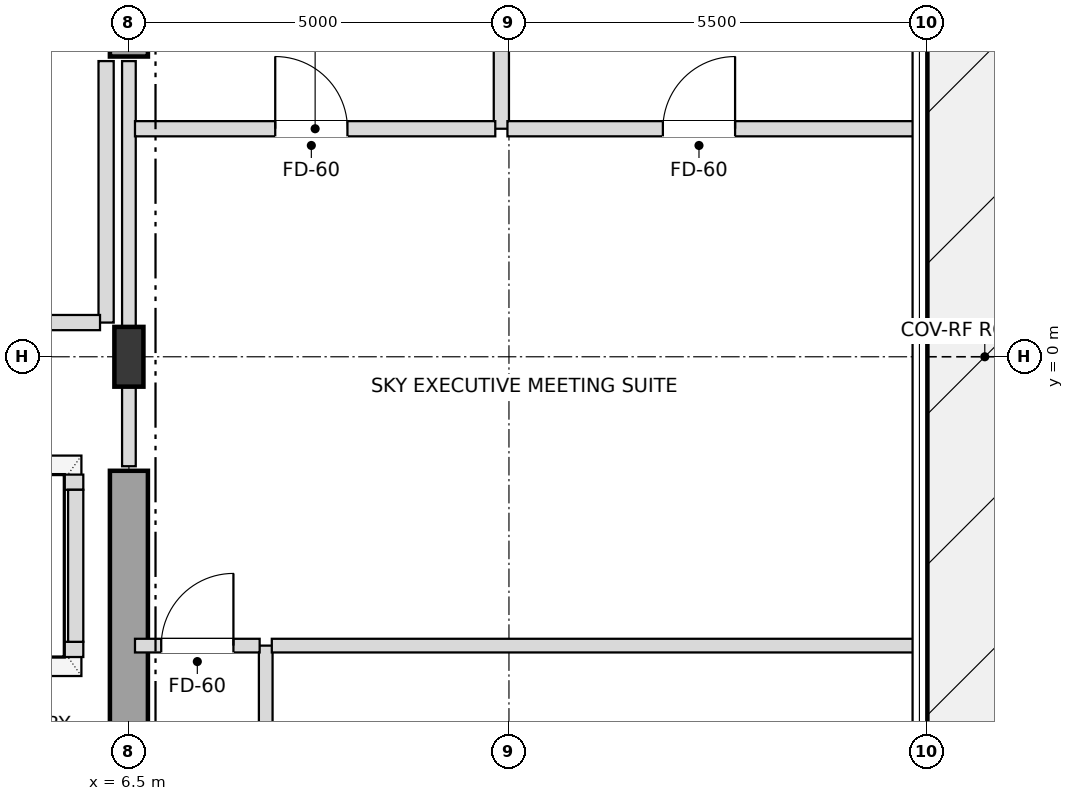
"""IFC4 building model, lengths in metres.
Left out: names, types, materials, properties, quantities, classifications, styles, units other than length and angle.
Written with IfcOpenShell. Run it as: python <this file> out.ifc"""

import sys

from ifc_helpers import new_model, si_unit, direction, frame, frame_2d, origin, origin_2d, place, context, subcontext, project, spatial, rectangle, i_section, extrude, element, fill, save


model = new_model("IFC4")
c1 = context("Model", 3, precision=1e-05, world=origin(), true_north=direction((0.0, 1.0)))
c2 = subcontext(c1, "Body", "Model", "MODEL_VIEW")
j1 = project(units=[si_unit("LENGTHUNIT", "METRE"), si_unit("PLANEANGLEUNIT", "RADIAN")], contexts=[c1])
p1 = place(None, origin())
s1 = spatial("IfcSite", under=j1, at=p1, CompositionType="ELEMENT")
p2 = place(p1, origin())
s2 = spatial("IfcBuilding", under=s1, at=p2, CompositionType="ELEMENT")
p3 = place(p2, frame((0.0, 0.0, 217.8)))
s3 = spatial("IfcBuildingStorey", under=s2, at=p3, CompositionType="ELEMENT", Elevation=217.8)
p4 = place(p3, frame((6.5, 0.0, 0.0), z_axis=(0.0, 0.0, 1.0), x_axis=(1.0, 0.0, 0.0)))
e1 = element("IfcColumn", 1, at=p4, inside=s3, PredefinedType="COLUMN", context=c2, shape_type="SweptSolid", body=[
    extrude(i_section(OverallWidth=0.382, OverallDepth=0.786, WebThickness=0.02, FlangeThickness=0.033, at=origin_2d()), origin(), (0.0, 0.0, 1.0), 4.5),
])
p5 = place(p3, frame((6.5, -7.25, 0.0), z_axis=(0.0, 0.0, 1.0), x_axis=(0.0, 1.0, 0.0)))
e2 = element("IfcWall", 2, at=p5, inside=s3, PredefinedType="SHEAR", context=c2, shape_type="SweptSolid", body=[
    extrude(rectangle(XDim=5.75, YDim=0.5, at=frame_2d((2.875, 0.0))), origin(), (0.0, 0.0, 1.0), 4.28),
])
p6 = place(p5, frame((0.85, 0.0, 0.0)))
e3 = element("IfcOpeningElement", 3, at=p6, cuts=e2, PredefinedType="OPENING", context=c2, shape_type="SweptSolid", body=[
    extrude(rectangle(XDim=1.05, YDim=2.15, at=frame_2d((0.525, 1.075))), frame((0.0, 0.26, 0.0), z_axis=(0.0, -1.0, 0.0), x_axis=(1.0, 0.0, 0.0)), (0.0, 0.0, 1.0), 0.52),
])
p7 = place(p3, frame((6.5, 3.95, 0.0), z_axis=(0.0, 0.0, 1.0), x_axis=(0.0, 1.0, 0.0)))
e4 = element("IfcWall", 4, at=p7, inside=s3, PredefinedType="SHEAR", context=c2, shape_type="SweptSolid", body=[
    extrude(rectangle(XDim=3.3, YDim=0.5, at=frame_2d((1.65, 0.0))), origin(), (0.0, 0.0, 1.0), 4.28),
])
p8 = place(p3, frame((1.8, -3.85, 0.0), z_axis=(0.0, 0.0, 1.0), x_axis=(1.0, 0.0, 0.0)))
e5 = element("IfcWall", 5, at=p8, inside=s3, PredefinedType="SOLIDWALL", context=c2, shape_type="SweptSolid", body=[
    extrude(rectangle(XDim=4.1, YDim=0.2, at=frame_2d((2.05, 0.0))), origin(), (0.0, 0.0, 1.0), 4.28),
])
p9 = place(p8, frame((0.45, 0.0, 0.0)))
e6 = element("IfcOpeningElement", 6, at=p9, cuts=e5, PredefinedType="OPENING", context=c2, shape_type="SweptSolid", body=[
    extrude(rectangle(XDim=1.2, YDim=2.2, at=frame_2d((0.6, 1.1))), frame((0.0, 0.11, 0.0), z_axis=(0.0, -1.0, 0.0), x_axis=(1.0, 0.0, 0.0)), (0.0, 0.0, 1.0), 0.22),
])
p10 = place(p8, frame((2.45, 0.0, 0.0)))
e7 = element("IfcOpeningElement", 7, at=p10, cuts=e5, PredefinedType="OPENING", context=c2, shape_type="SweptSolid", body=[
    extrude(rectangle(XDim=1.2, YDim=2.2, at=frame_2d((0.6, 1.1))), frame((0.0, 0.11, 0.0), z_axis=(0.0, -1.0, 0.0), x_axis=(1.0, 0.0, 0.0)), (0.0, 0.0, 1.0), 0.22),
])
p11 = place(p3, frame((1.8, -1.65, 0.0), z_axis=(0.0, 0.0, 1.0), x_axis=(1.0, 0.0, 0.0)))
e8 = element("IfcWall", 8, at=p11, inside=s3, PredefinedType="SOLIDWALL", context=c2, shape_type="SweptSolid", body=[
    extrude(rectangle(XDim=4.1, YDim=0.2, at=frame_2d((2.05, 0.0))), origin(), (0.0, 0.0, 1.0), 4.28),
])
p12 = place(p3, frame((5.8, -3.75, 0.0), z_axis=(0.0, 0.0, 1.0), x_axis=(0.0, 1.0, 0.0)))
e9 = element("IfcWall", 9, at=p12, inside=s3, PredefinedType="SOLIDWALL", context=c2, shape_type="SweptSolid", body=[
    extrude(rectangle(XDim=2.0, YDim=0.2, at=frame_2d((1.0, 0.0))), origin(), (0.0, 0.0, 1.0), 4.28),
])
p13 = place(p3, frame((6.2, 0.45, 0.0), z_axis=(0.0, 0.0, 1.0), x_axis=(0.0, 1.0, 0.0)))
e10 = element("IfcWall", 10, at=p13, inside=s3, PredefinedType="SOLIDWALL", context=c2, shape_type="SweptSolid", body=[
    extrude(rectangle(XDim=3.44, YDim=0.2, at=frame_2d((1.72, 0.0))), origin(), (0.0, 0.0, 1.0), 4.28),
])
p14 = place(p3, frame((6.5, -1.44, 0.0), z_axis=(0.0, 0.0, 1.0), x_axis=(0.0, 1.0, 0.0)))
e11 = element("IfcWall", 11, at=p14, inside=s3, PredefinedType="PARTITIONING", context=c2, shape_type="SweptSolid", body=[
    extrude(rectangle(XDim=5.33, YDim=0.18, at=frame_2d((2.665, 0.0))), origin(), (0.0, 0.0, 1.0), 3.726),
])
p15 = place(p3, frame((8.3, -9.2, 0.0), z_axis=(0.0, 0.0, 1.0), x_axis=(0.0, 1.0, 0.0)))
e12 = element("IfcWall", 12, at=p15, inside=s3, PredefinedType="PARTITIONING", context=c2, shape_type="SweptSolid", body=[
    extrude(rectangle(XDim=5.4, YDim=0.18, at=frame_2d((2.7, 0.0))), origin(), (0.0, 0.0, 1.0), 3.726),
])
p16 = place(p15, frame((3.125, 0.0, 0.0)))
e13 = element("IfcOpeningElement", 13, at=p16, cuts=e12, PredefinedType="OPENING", context=c2, shape_type="SweptSolid", body=[
    extrude(rectangle(XDim=0.95, YDim=2.15, at=frame_2d((0.475, 1.075))), frame((0.0, 0.1, 0.0), z_axis=(0.0, -1.0, 0.0), x_axis=(1.0, 0.0, 0.0)), (0.0, 0.0, 1.0), 0.2),
])
p17 = place(p3, frame((11.4, 3.0, 0.0), z_axis=(0.0, 0.0, 1.0), x_axis=(0.0, 1.0, 0.0)))
e14 = element("IfcWall", 14, at=p17, inside=s3, PredefinedType="SOLIDWALL", context=c2, shape_type="SweptSolid", body=[
    extrude(rectangle(XDim=4.5, YDim=0.2, at=frame_2d((2.25, 0.0))), origin(), (0.0, 0.0, 1.0), 3.918),
])
p18 = place(p3, frame((6.58, -3.8, 0.0), z_axis=(0.0, 0.0, 1.0), x_axis=(1.0, 0.0, 0.0)))
e15 = element("IfcWall", 15, at=p18, inside=s3, PredefinedType="PARTITIONING", context=c2, shape_type="SweptSolid", body=[
    extrude(rectangle(XDim=1.64, YDim=0.18, at=frame_2d((0.82, 0.0))), origin(), (0.0, 0.0, 1.0), 4.28),
])
p19 = place(p18, frame((0.345, 0.0, 0.0)))
e16 = element("IfcOpeningElement", 16, at=p19, cuts=e15, PredefinedType="OPENING", context=c2, shape_type="SweptSolid", body=[
    extrude(rectangle(XDim=0.95, YDim=2.15, at=frame_2d((0.475, 1.075))), frame((0.0, 0.1, 0.0), z_axis=(0.0, -1.0, 0.0), x_axis=(1.0, 0.0, 0.0)), (0.0, 0.0, 1.0), 0.2),
])
p20 = place(p3, frame((8.38, -3.8, 0.0), z_axis=(0.0, 0.0, 1.0), x_axis=(1.0, 0.0, 0.0)))
e17 = element("IfcWall", 17, at=p20, inside=s3, PredefinedType="PARTITIONING", context=c2, shape_type="SweptSolid", body=[
    extrude(rectangle(XDim=8.44, YDim=0.18, at=frame_2d((4.22, 0.0))), origin(), (0.0, 0.0, 1.0), 3.918),
])
p21 = place(p3, frame((4.13, 0.45, 0.0), z_axis=(0.0, 0.0, 1.0), x_axis=(1.0, 0.0, 0.0)))
e18 = element("IfcWall", 18, at=p21, inside=s3, PredefinedType="SOLIDWALL", context=c2, shape_type="SweptSolid", body=[
    extrude(rectangle(XDim=1.99, YDim=0.2, at=frame_2d((0.995, 0.0))), origin(), (0.0, 0.0, 1.0), 4.28),
])
p22 = place(p3, frame((6.58, 3.0, 0.0), z_axis=(0.0, 0.0, 1.0), x_axis=(1.0, 0.0, 0.0)))
e19 = element("IfcWall", 19, at=p22, inside=s3, PredefinedType="SOLIDWALL", context=c2, shape_type="SweptSolid", body=[
    extrude(rectangle(XDim=4.74, YDim=0.2, at=frame_2d((2.37, 0.0))), origin(), (0.0, 0.0, 1.0), 4.28),
])
p23 = place(p22, frame((1.845, 0.0, 0.0)))
e20 = element("IfcOpeningElement", 20, at=p23, cuts=e19, PredefinedType="OPENING", context=c2, shape_type="SweptSolid", body=[
    extrude(rectangle(XDim=0.95, YDim=2.15, at=frame_2d((0.475, 1.075))), frame((0.0, 0.11, 0.0), z_axis=(0.0, -1.0, 0.0), x_axis=(1.0, 0.0, 0.0)), (0.0, 0.0, 1.0), 0.22),
])
p24 = place(p3, frame((11.48, 3.0, 0.0), z_axis=(0.0, 0.0, 1.0), x_axis=(1.0, 0.0, 0.0)))
e21 = element("IfcWall", 21, at=p24, inside=s3, PredefinedType="SOLIDWALL", context=c2, shape_type="SweptSolid", body=[
    extrude(rectangle(XDim=5.34, YDim=0.2, at=frame_2d((2.67, 0.0))), origin(), (0.0, 0.0, 1.0), 4.28),
])
p25 = place(p24, frame((2.045, 0.0, 0.0)))
e22 = element("IfcOpeningElement", 22, at=p25, cuts=e21, PredefinedType="OPENING", context=c2, shape_type="SweptSolid", body=[
    extrude(rectangle(XDim=0.95, YDim=2.15, at=frame_2d((0.475, 1.075))), frame((0.0, 0.11, 0.0), z_axis=(0.0, -1.0, 0.0), x_axis=(1.0, 0.0, 0.0)), (0.0, 0.0, 1.0), 0.22),
])
p26 = place(p19, origin())
e23 = element("IfcDoor", 23, at=p26, inside=s3, OperationType="SINGLE_SWING_RIGHT", PredefinedType="DOOR", context=c2, shape_type="SweptSolid", body=[
    extrude(rectangle(XDim=0.95, YDim=2.15, at=frame_2d((0.475, 1.075))), frame((0.0, 0.025, 0.0), z_axis=(0.0, -1.0, 0.0), x_axis=(1.0, 0.0, 0.0)), (0.0, 0.0, 1.0), 0.05),
])
fill(e16, e23)
p27 = place(p23, origin())
e24 = element("IfcDoor", 24, at=p27, inside=s3, OperationType="SINGLE_SWING_LEFT", PredefinedType="DOOR", context=c2, shape_type="SweptSolid", body=[
    extrude(rectangle(XDim=0.95, YDim=2.15, at=frame_2d((0.475, 1.075))), frame((0.0, 0.025, 0.0), z_axis=(0.0, -1.0, 0.0), x_axis=(1.0, 0.0, 0.0)), (0.0, 0.0, 1.0), 0.05),
])
fill(e20, e24)
p28 = place(p25, origin())
e25 = element("IfcDoor", 25, at=p28, inside=s3, OperationType="SINGLE_SWING_RIGHT", PredefinedType="DOOR", context=c2, shape_type="SweptSolid", body=[
    extrude(rectangle(XDim=0.95, YDim=2.15, at=frame_2d((0.475, 1.075))), frame((0.0, 0.025, 0.0), z_axis=(0.0, -1.0, 0.0), x_axis=(1.0, 0.0, 0.0)), (0.0, 0.0, 1.0), 0.05),
])
fill(e22, e25)
save(model, sys.argv[1])
